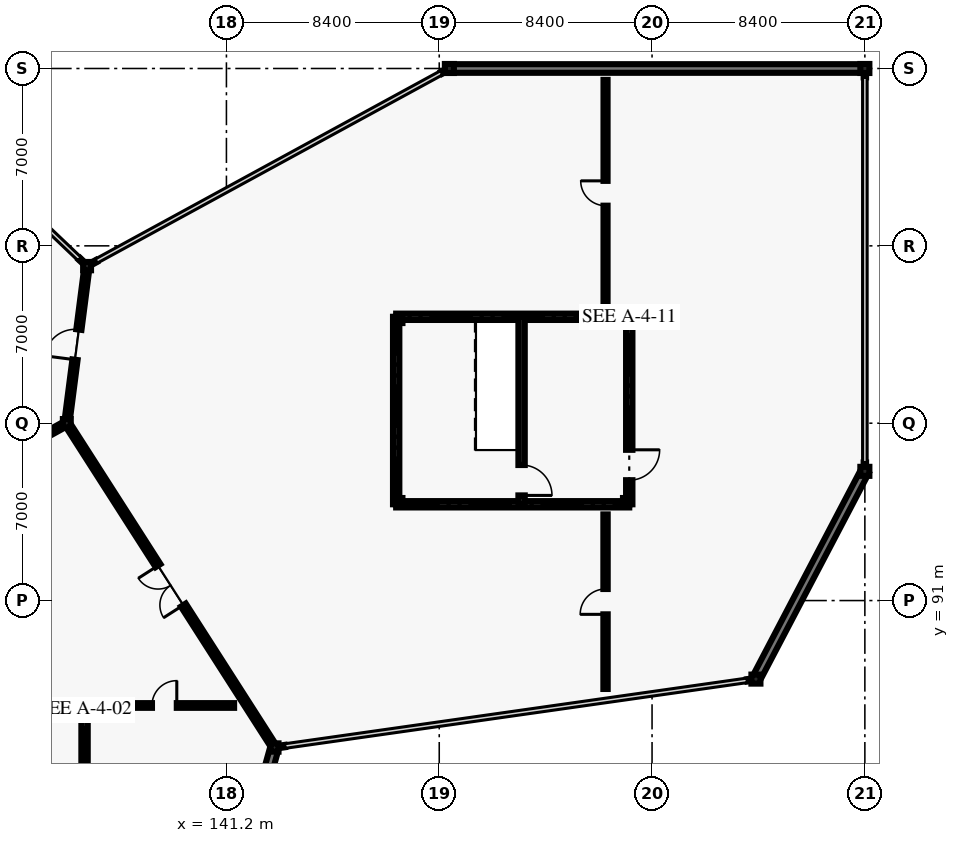
"""IFC4 building model, lengths in metres.
Left out: names, types, materials, properties, quantities, classifications, styles, units other than length and angle.
Written with IfcOpenShell. Run it as: python <this file> out.ifc"""

import sys

from ifc_helpers import new_model, si_unit, direction, frame, frame_2d, origin, origin_2d, place, context, subcontext, project, spatial, rectangle, hollow_circle, i_section, extrude, element, fill, save


model = new_model("IFC4")
c1 = context("Model", 3, precision=1e-05, world=origin(), true_north=direction((0.0, 1.0)))
c2 = subcontext(c1, "Body", "Model", "MODEL_VIEW")
j1 = project(units=[si_unit("LENGTHUNIT", "METRE"), si_unit("PLANEANGLEUNIT", "RADIAN")], contexts=[c1])
p1 = place(None, origin())
s1 = spatial("IfcSite", under=j1, at=p1, CompositionType="ELEMENT")
p2 = place(p1, origin())
s2 = spatial("IfcBuilding", under=s1, at=p2, CompositionType="ELEMENT")
p3 = place(p2, frame((0.0, 0.0, 10.2)))
s3 = spatial("IfcBuildingStorey", under=s2, at=p3, CompositionType="ELEMENT", Elevation=10.2)
for number, where, z_axis, x_axis in (
    (1, (134.9, 98.0, 0.0), (0.0, 0.0, 1.0), (1.0, 0.0, 0.0)),
    (2, (135.7, 104.2, 0.0), (0.0, 0.0, 1.0), (1.0, 0.0, 0.0)),
    (3, (143.1, 85.2, 0.0), (0.0, 0.0, 1.0), (1.0, 0.0, 0.0)),
):
    element("IfcColumn", number, at=place(p3, frame(where, z_axis=z_axis, x_axis=x_axis)), inside=s3, PredefinedType="COLUMN", context=c2, shape_type="SweptSolid", body=[
        extrude(i_section(OverallWidth=0.311, OverallDepth=0.327, WebThickness=0.016, FlangeThickness=0.025, FilletRadius=0.017, at=origin_2d()), origin(), (0.0, 0.0, 1.0), 4.8),
    ])
for number, where, z_axis, x_axis in (
    (4, (150.0, 112.0, 0.0), (0.0, 0.0, 1.0), (1.0, 0.0, 0.0)),
    (5, (162.1, 87.9, 0.0), (0.0, 0.0, 1.0), (1.0, 0.0, 0.0)),
    (6, (166.4, 96.1, 0.0), (0.0, 0.0, 1.0), (1.0, 0.0, 0.0)),
    (7, (166.4, 112.0, 0.0), (0.0, 0.0, 1.0), (1.0, 0.0, 0.0)),
):
    element("IfcColumn", number, at=place(p3, frame(where, z_axis=z_axis, x_axis=x_axis)), inside=s3, PredefinedType="COLUMN", context=c2, shape_type="SweptSolid", body=[
        extrude(hollow_circle(Radius=0.178, WallThickness=0.013, at=origin_2d()), origin(), (0.0, 0.0, 1.0), 4.8),
    ])
p4 = place(p3, frame((135.48, 86.58, 0.0), z_axis=(0.0, 0.0, 1.0), x_axis=(1.0, 0.0, 0.0)))
e8 = element("IfcColumn", 8, at=p4, inside=s3, PredefinedType="COLUMN", context=c2, shape_type="SweptSolid", body=[
    extrude(i_section(OverallWidth=0.311, OverallDepth=0.327, WebThickness=0.016, FlangeThickness=0.025, FilletRadius=0.017, at=origin_2d()), origin(), (0.0, 0.0, 1.0), 4.8),
])
for number, where, z_axis, x_axis in (
    (9, (148.02, 94.92, 0.0), (0.0, 0.0, 1.0), (1.0, 0.0, 0.0)),
    (10, (156.98, 94.92, 0.0), (0.0, 0.0, 1.0), (1.0, 0.0, 0.0)),
    (11, (156.98, 102.08, 0.0), (0.0, 0.0, 1.0), (1.0, 0.0, 0.0)),
    (12, (148.02, 102.08, 0.0), (0.0, 0.0, 1.0), (1.0, 0.0, 0.0)),
):
    element("IfcColumn", number, at=place(p3, frame(where, z_axis=z_axis, x_axis=x_axis)), inside=s3, PredefinedType="COLUMN", context=c2, shape_type="SweptSolid", body=[
        extrude(i_section(OverallWidth=0.254, OverallDepth=0.254, WebThickness=0.009, FlangeThickness=0.014, FilletRadius=0.013, at=origin_2d()), origin(), (0.0, 0.0, 1.0), 4.8),
    ])
p5 = place(p3, frame((143.084, 85.142, 0.0), z_axis=(0.0, 0.0, 1.0), x_axis=(-0.268810029922, -0.963193214165, 0.0)))
e13 = element("IfcWall", 13, at=p5, inside=s3, PredefinedType="SOLIDWALL", context=c2, shape_type="SweptSolid", body=[
    extrude(rectangle(XDim=13.333, YDim=0.34, at=frame_2d((6.667, 0.0))), origin(), (0.0, 0.0, 1.0), 3.62),
])
p6 = place(p3, frame((135.403, 104.482, 0.0), z_axis=(0.0, 0.0, 1.0), x_axis=(0.726243974232, -0.687437044311, 0.0)))
e14 = element("IfcWall", 14, at=p6, inside=s3, PredefinedType="SOLIDWALL", context=c2, shape_type="SweptSolid", body=[
    extrude(rectangle(XDim=0.308, YDim=0.095, at=frame_2d((0.154, 0.0))), origin(), (0.0, 0.0, 1.0), 3.62),
])
for number, where, z_axis, x_axis in (
    (15, (162.058, 87.894, 0.0), (0.0, 0.0, 1.0), (-0.99, -0.139, 0.0)),
    (16, (143.506, 85.257, 0.0), (0.0, 0.0, 1.0), (-0.99, -0.139, 0.0)),
):
    element("IfcWall", number, at=place(p3, frame(where, z_axis=z_axis, x_axis=x_axis)), inside=s3, PredefinedType="SOLIDWALL", context=c2, shape_type="SweptSolid", body=[
        extrude(rectangle(XDim=0.308, YDim=0.095, at=frame_2d((0.154, 0.0))), origin(), (0.0, 0.0, 1.0), 3.62),
    ])
p7 = place(p3, frame((166.4, 96.1, 0.0), z_axis=(0.0, 0.0, 1.0), x_axis=(-0.464385293852, -0.885633275602, 0.0)))
e17 = element("IfcWall", 17, at=p7, inside=s3, PredefinedType="SOLIDWALL", context=c2, shape_type="SweptSolid", body=[
    extrude(rectangle(XDim=9.259, YDim=0.34, at=frame_2d((4.629, 0.0))), origin(), (0.0, 0.0, 1.0), 3.62),
])
p8 = place(p3, frame((166.4, 111.958, 0.0), z_axis=(0.0, 0.0, 1.0), x_axis=(0.0, -1.0, 0.0)))
e18 = element("IfcWall", 18, at=p8, inside=s3, PredefinedType="SOLIDWALL", context=c2, shape_type="SweptSolid", body=[
    extrude(rectangle(XDim=0.308, YDim=0.095, at=frame_2d((0.154, 0.0))), origin(), (0.0, 0.0, 1.0), 3.62),
])
p9 = place(p3, frame((166.4, 96.45, 0.0), z_axis=(0.0, 0.0, 1.0), x_axis=(0.0, -1.0, 0.0)))
e19 = element("IfcWall", 19, at=p9, inside=s3, PredefinedType="SOLIDWALL", context=c2, shape_type="SweptSolid", body=[
    extrude(rectangle(XDim=0.308, YDim=0.095, at=frame_2d((0.154, 0.0))), origin(), (0.0, 0.0, 1.0), 3.62),
])
p10 = place(p3, frame((150.0, 112.0, 0.0), z_axis=(0.0, 0.0, 1.0), x_axis=(1.0, 0.0, 0.0)))
e20 = element("IfcWall", 20, at=p10, inside=s3, PredefinedType="SOLIDWALL", context=c2, shape_type="SweptSolid", body=[
    extrude(rectangle(XDim=16.4, YDim=0.34, at=frame_2d((8.2, 0.0))), origin(), (0.0, 0.0, 1.0), 3.62),
])
p11 = place(p3, frame((135.79, 104.249, 0.0), z_axis=(0.0, 0.0, 1.0), x_axis=(0.876984894636, 0.480517944077, 0.0)))
e21 = element("IfcWall", 21, at=p11, inside=s3, PredefinedType="SOLIDWALL", context=c2, shape_type="SweptSolid", body=[
    extrude(rectangle(XDim=0.308, YDim=0.095, at=frame_2d((0.154, 0.0))), origin(), (0.0, 0.0, 1.0), 3.62),
])
p12 = place(p3, frame((149.693, 111.832, 0.0), z_axis=(0.0, 0.0, 1.0), x_axis=(0.876801617046, 0.480852289529, 0.0)))
e22 = element("IfcWall", 22, at=p12, inside=s3, PredefinedType="SOLIDWALL", context=c2, shape_type="SweptSolid", body=[
    extrude(rectangle(XDim=0.308, YDim=0.095, at=frame_2d((0.154, 0.0))), origin(), (0.0, 0.0, 1.0), 3.62),
])
p13 = place(p3, frame((134.9, 98.0, 0.0), z_axis=(0.0, 0.0, 1.0), x_axis=(-0.875181353329, -0.483794996652, 0.0)))
e23 = element("IfcWall", 23, at=p13, inside=s3, PredefinedType="SOLIDWALL", context=c2, shape_type="SweptSolid", body=[
    extrude(rectangle(XDim=18.396, YDim=0.225, at=frame_2d((9.198, 0.0))), origin(), (0.0, 0.0, 1.0), 4.02),
])
p14 = place(p13, frame((8.198, 0.0, 0.0)))
e24 = element("IfcOpeningElement", 24, at=p14, cuts=e23, PredefinedType="OPENING", context=c2, shape_type="SweptSolid", body=[
    extrude(rectangle(XDim=2.0, YDim=2.5, at=frame_2d((1.0, 1.25))), frame((0.0, 0.123, 0.0), z_axis=(0.0, -1.0, 0.0), x_axis=(1.0, 0.0, 0.0)), (0.0, 0.0, 1.0), 0.245),
])
p15 = place(p3, frame((143.1, 85.2, 0.0), z_axis=(0.0, 0.0, 1.0), x_axis=(-0.539434641352, 0.842027474439, 0.0)))
e25 = element("IfcWall", 25, at=p15, inside=s3, PredefinedType="SOLIDWALL", context=c2, shape_type="SweptSolid", body=[
    extrude(rectangle(XDim=15.201, YDim=0.225, at=frame_2d((7.601, 0.0))), origin(), (0.0, 0.0, 1.0), 4.02),
])
p16 = place(p15, frame((6.676, 0.0, 0.0)))
e26 = element("IfcOpeningElement", 26, at=p16, cuts=e25, PredefinedType="OPENING", context=c2, shape_type="SweptSolid", body=[
    extrude(rectangle(XDim=1.85, YDim=2.4, at=frame_2d((0.925, 1.2))), frame((0.0, 0.123, 0.0), z_axis=(0.0, -1.0, 0.0), x_axis=(1.0, 0.0, 0.0)), (0.0, 0.0, 1.0), 0.245),
])
p17 = place(p3, frame((134.9, 98.0, 0.0), z_axis=(0.0, 0.0, 1.0), x_axis=(0.127980011854, 0.991776747341, 0.0)))
e27 = element("IfcWall", 27, at=p17, inside=s3, PredefinedType="SOLIDWALL", context=c2, shape_type="SweptSolid", body=[
    extrude(rectangle(XDim=6.251, YDim=0.205, at=frame_2d((3.126, 0.0))), origin(), (0.0, 0.0, 1.0), 3.32),
])
p18 = place(p17, frame((2.526, 0.0, 0.0)))
e28 = element("IfcOpeningElement", 28, at=p18, cuts=e27, PredefinedType="OPENING", context=c2, shape_type="SweptSolid", body=[
    extrude(rectangle(XDim=1.2, YDim=2.2, at=frame_2d((0.6, 1.1))), frame((0.0, 0.113, 0.0), z_axis=(0.0, -1.0, 0.0), x_axis=(1.0, 0.0, 0.0)), (0.0, 0.0, 1.0), 0.225),
])
p19 = place(p3, frame((136.0, 86.859, 0.0), z_axis=(0.0, 0.0, 1.0), x_axis=(1.0, 0.0, 0.0)))
e29 = element("IfcWall", 29, at=p19, inside=s3, PredefinedType="PARTITIONING", context=c2, shape_type="SweptSolid", body=[
    extrude(rectangle(XDim=5.503, YDim=0.185, at=frame_2d((2.751, 0.0))), origin(), (0.0, 0.0, 1.0), 3.32),
])
p20 = place(p19, frame((2.261, 0.0, 0.0)))
e30 = element("IfcOpeningElement", 30, at=p20, cuts=e29, PredefinedType="OPENING", context=c2, shape_type="SweptSolid", body=[
    extrude(rectangle(XDim=0.98, YDim=2.15, at=frame_2d((0.49, 1.075))), frame((0.0, 0.103, 0.0), z_axis=(0.0, -1.0, 0.0), x_axis=(1.0, 0.0, 0.0)), (0.0, 0.0, 1.0), 0.205),
])
p21 = place(p3, frame((156.164, 87.511, 0.0), z_axis=(0.0, 0.0, 1.0), x_axis=(0.0, 1.0, 0.0)))
e31 = element("IfcWall", 31, at=p21, inside=s3, PredefinedType="PARTITIONING", context=c2, shape_type="SweptSolid", body=[
    extrude(rectangle(XDim=6.889, YDim=0.17, at=frame_2d((3.444, 0.0))), origin(), (0.0, 0.0, 1.0), 3.32),
])
p22 = place(p21, frame((2.945, 0.0, 0.0)))
e32 = element("IfcOpeningElement", 32, at=p22, cuts=e31, PredefinedType="OPENING", context=c2, shape_type="SweptSolid", body=[
    extrude(rectangle(XDim=1.0, YDim=2.15, at=frame_2d((0.5, 1.075))), frame((0.0, 0.095, 0.0), z_axis=(0.0, -1.0, 0.0), x_axis=(1.0, 0.0, 0.0)), (0.0, 0.0, 1.0), 0.19),
])
p23 = place(p3, frame((156.164, 102.6, 0.0), z_axis=(0.0, 0.0, 1.0), x_axis=(0.0, 1.0, 0.0)))
e33 = element("IfcWall", 33, at=p23, inside=s3, PredefinedType="PARTITIONING", context=c2, shape_type="SweptSolid", body=[
    extrude(rectangle(XDim=8.95, YDim=0.16, at=frame_2d((4.475, 0.0))), origin(), (0.0, 0.0, 1.0), 3.32),
])
p24 = place(p23, frame((3.985, 0.0, 0.0)))
e34 = element("IfcOpeningElement", 34, at=p24, cuts=e33, PredefinedType="OPENING", context=c2, shape_type="SweptSolid", body=[
    extrude(rectangle(XDim=0.98, YDim=2.15, at=frame_2d((0.49, 1.075))), frame((0.0, 0.09, 0.0), z_axis=(0.0, -1.0, 0.0), x_axis=(1.0, 0.0, 0.0)), (0.0, 0.0, 1.0), 0.18),
])
p25 = place(p3, frame((126.4, 86.7, 0.0), z_axis=(0.0, 0.0, 1.0), x_axis=(1.0, 0.0, 0.0)))
e35 = element("IfcWall", 35, at=p25, inside=s3, PredefinedType="SHEAR", context=c2, shape_type="SweptSolid", body=[
    extrude(rectangle(XDim=9.2, YDim=0.25, at=frame_2d((4.6, 0.0))), origin(), (0.0, 0.0, 1.0), 4.56),
])
p26 = place(p3, frame((135.6, 86.7, 0.0), z_axis=(0.0, 0.0, 1.0), x_axis=(0.0, -1.0, 0.0)))
e36 = element("IfcWall", 36, at=p26, inside=s3, PredefinedType="SHEAR", context=c2, shape_type="SweptSolid", body=[
    extrude(rectangle(XDim=7.4, YDim=0.25, at=frame_2d((3.7, 0.0))), origin(), (0.0, 0.0, 1.0), 4.56),
])
p27 = place(p26, frame((5.25, 0.0, 0.0)))
e37 = element("IfcOpeningElement", 37, at=p27, cuts=e36, PredefinedType="OPENING", context=c2, shape_type="SweptSolid", body=[
    extrude(rectangle(XDim=1.2, YDim=2.2, at=frame_2d((0.6, 1.1))), frame((0.0, 0.135, 0.0), z_axis=(0.0, -1.0, 0.0), x_axis=(1.0, 0.0, 0.0)), (0.0, 0.0, 1.0), 0.27),
])
p28 = place(p3, frame((147.9, 94.8, 0.0), z_axis=(0.0, 0.0, 1.0), x_axis=(0.0, 1.0, 0.0)))
e38 = element("IfcWall", 38, at=p28, inside=s3, PredefinedType="SHEAR", context=c2, shape_type="SweptSolid", body=[
    extrude(rectangle(XDim=7.4, YDim=0.25, at=frame_2d((3.7, 0.0))), origin(), (0.0, 0.0, 1.0), 4.56),
])
for number, where, z_axis, x_axis in (
    (39, (147.9, 102.2, 0.0), (0.0, 0.0, 1.0), (1.0, 0.0, 0.0)),
    (40, (157.1, 94.8, 0.0), (0.0, 0.0, 1.0), (-1.0, 0.0, 0.0)),
):
    element("IfcWall", number, at=place(p3, frame(where, z_axis=z_axis, x_axis=x_axis)), inside=s3, PredefinedType="SHEAR", context=c2, shape_type="SweptSolid", body=[
        extrude(rectangle(XDim=9.2, YDim=0.25, at=frame_2d((4.6, 0.0))), origin(), (0.0, 0.0, 1.0), 4.56),
    ])
p29 = place(p3, frame((157.1, 102.2, 0.0), z_axis=(0.0, 0.0, 1.0), x_axis=(0.0, -1.0, 0.0)))
e41 = element("IfcWall", 41, at=p29, inside=s3, PredefinedType="SHEAR", context=c2, shape_type="SweptSolid", body=[
    extrude(rectangle(XDim=7.4, YDim=0.25, at=frame_2d((3.7, 0.0))), origin(), (0.0, 0.0, 1.0), 4.56),
])
p30 = place(p29, frame((5.25, 0.0, 0.0)))
e42 = element("IfcOpeningElement", 42, at=p30, cuts=e41, PredefinedType="OPENING", context=c2, shape_type="SweptSolid", body=[
    extrude(rectangle(XDim=1.2, YDim=2.2, at=frame_2d((0.6, 1.1))), frame((0.0, 0.135, 0.0), z_axis=(0.0, -1.0, 0.0), x_axis=(1.0, 0.0, 0.0)), (0.0, 0.0, 1.0), 0.27),
])
p31 = place(p3, frame((152.85, 102.2, 0.0), z_axis=(0.0, 0.0, 1.0), x_axis=(0.0, -1.0, 0.0)))
e43 = element("IfcWall", 43, at=p31, inside=s3, PredefinedType="SHEAR", context=c2, shape_type="SweptSolid", body=[
    extrude(rectangle(XDim=7.4, YDim=0.25, at=frame_2d((3.7, 0.0))), origin(), (0.0, 0.0, 1.0), 4.56),
])
p32 = place(p31, frame((5.85, 0.0, 0.0)))
e44 = element("IfcOpeningElement", 44, at=p32, cuts=e43, PredefinedType="OPENING", context=c2, shape_type="SweptSolid", body=[
    extrude(rectangle(XDim=1.2, YDim=2.2, at=frame_2d((0.6, 1.1))), frame((0.0, 0.135, 0.0), z_axis=(0.0, -1.0, 0.0), x_axis=(1.0, 0.0, 0.0)), (0.0, 0.0, 1.0), 0.27),
])
p33 = place(p16, origin())
e45 = element("IfcDoor", 45, at=p33, inside=s3, OperationType="DOUBLE_DOOR_SINGLE_SWING", PredefinedType="DOOR", context=c2, shape_type="SweptSolid", body=[
    extrude(rectangle(XDim=1.85, YDim=2.4, at=frame_2d((0.925, 1.2))), frame((0.0, 0.025, 0.0), z_axis=(0.0, -1.0, 0.0), x_axis=(1.0, 0.0, 0.0)), (0.0, 0.0, 1.0), 0.05),
])
fill(e26, e45)
p34 = place(p18, origin())
e46 = element("IfcDoor", 46, at=p34, inside=s3, OperationType="SINGLE_SWING_LEFT", PredefinedType="DOOR", context=c2, shape_type="SweptSolid", body=[
    extrude(rectangle(XDim=1.2, YDim=2.2, at=frame_2d((0.6, 1.1))), frame((0.0, 0.025, 0.0), z_axis=(0.0, -1.0, 0.0), x_axis=(1.0, 0.0, 0.0)), (0.0, 0.0, 1.0), 0.05),
])
fill(e28, e46)
p35 = place(p20, origin())
e47 = element("IfcDoor", 47, at=p35, inside=s3, OperationType="SINGLE_SWING_RIGHT", PredefinedType="DOOR", context=c2, shape_type="SweptSolid", body=[
    extrude(rectangle(XDim=0.98, YDim=2.15, at=frame_2d((0.49, 1.075))), frame((0.0, 0.025, 0.0), z_axis=(0.0, -1.0, 0.0), x_axis=(1.0, 0.0, 0.0)), (0.0, 0.0, 1.0), 0.05),
])
fill(e30, e47)
p36 = place(p22, origin())
e48 = element("IfcDoor", 48, at=p36, inside=s3, OperationType="SINGLE_SWING_LEFT", PredefinedType="DOOR", context=c2, shape_type="SweptSolid", body=[
    extrude(rectangle(XDim=1.0, YDim=2.15, at=frame_2d((0.5, 1.075))), frame((0.0, 0.025, 0.0), z_axis=(0.0, -1.0, 0.0), x_axis=(1.0, 0.0, 0.0)), (0.0, 0.0, 1.0), 0.05),
])
fill(e32, e48)
p37 = place(p24, origin())
e49 = element("IfcDoor", 49, at=p37, inside=s3, OperationType="SINGLE_SWING_RIGHT", PredefinedType="DOOR", context=c2, shape_type="SweptSolid", body=[
    extrude(rectangle(XDim=0.98, YDim=2.15, at=frame_2d((0.49, 1.075))), frame((0.0, 0.025, 0.0), z_axis=(0.0, -1.0, 0.0), x_axis=(1.0, 0.0, 0.0)), (0.0, 0.0, 1.0), 0.05),
])
fill(e34, e49)
p38 = place(p30, origin())
e50 = element("IfcDoor", 50, at=p38, inside=s3, OperationType="SINGLE_SWING_LEFT", PredefinedType="DOOR", context=c2, shape_type="SweptSolid", body=[
    extrude(rectangle(XDim=1.2, YDim=2.2, at=frame_2d((0.6, 1.1))), frame((0.0, 0.025, 0.0), z_axis=(0.0, -1.0, 0.0), x_axis=(1.0, 0.0, 0.0)), (0.0, 0.0, 1.0), 0.05),
])
fill(e42, e50)
p39 = place(p32, origin())
e51 = element("IfcDoor", 51, at=p39, inside=s3, OperationType="SINGLE_SWING_RIGHT", PredefinedType="DOOR", context=c2, shape_type="SweptSolid", body=[
    extrude(rectangle(XDim=1.2, YDim=2.2, at=frame_2d((0.6, 1.1))), frame((0.0, 0.025, 0.0), z_axis=(0.0, -1.0, 0.0), x_axis=(1.0, 0.0, 0.0)), (0.0, 0.0, 1.0), 0.05),
])
fill(e44, e51)
save(model, sys.argv[1])
